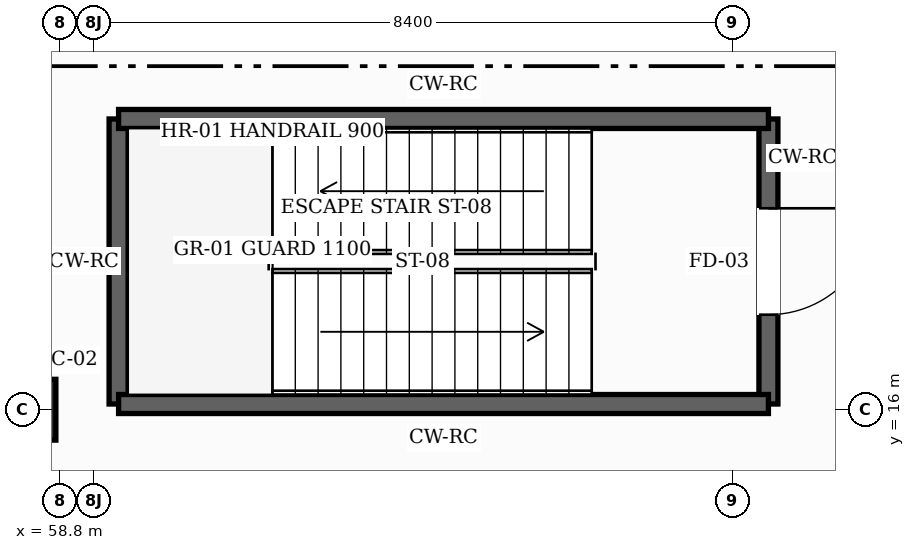
"""IFC4 building model, lengths in metres.
Left out: names, types, materials, properties, quantities, classifications, styles, units other than length and angle.
Written with IfcOpenShell. Run it as: python <this file> out.ifc"""

import sys

from ifc_helpers import new_model, si_unit, direction, frame, frame_2d, origin, origin_2d, place, context, subcontext, project, spatial, rectangle, hollow_rectangle, extrude, element, fill, save


model = new_model("IFC4")
c1 = context("Model", 3, precision=1e-05, world=origin(), true_north=direction((0.0, 1.0)))
c2 = subcontext(c1, "Body", "Model", "MODEL_VIEW")
j1 = project(units=[si_unit("LENGTHUNIT", "METRE"), si_unit("PLANEANGLEUNIT", "RADIAN")], contexts=[c1])
p1 = place(None, origin())
s1 = spatial("IfcSite", under=j1, at=p1, CompositionType="ELEMENT")
p2 = place(p1, origin())
s2 = spatial("IfcBuilding", under=s1, at=p2, CompositionType="ELEMENT")
p3 = place(p2, frame((0.0, 0.0, -5.4)))
s3 = spatial("IfcBuildingStorey", under=s2, at=p3, CompositionType="ELEMENT", Elevation=-5.4)
p4 = place(p3, frame((58.35, 16.0, 0.0), z_axis=(0.0, 0.0, 1.0), x_axis=(1.0, 0.0, 0.0)))
e1 = element("IfcColumn", 1, at=p4, inside=s3, PredefinedType="COLUMN", context=c2, shape_type="SweptSolid", body=[
    extrude(hollow_rectangle(XDim=0.8, YDim=0.8, WallThickness=0.032, InnerFilletRadius=0.032, OuterFilletRadius=0.064, at=origin_2d()), origin(), (0.0, 0.0, 1.0), 5.4),
])
p5 = place(p3, frame((68.125, 19.825, 0.0), z_axis=(0.0, 0.0, 1.0), x_axis=(0.0, -1.0, 0.0)))
e2 = element("IfcWall", 2, at=p5, inside=s3, PredefinedType="SHEAR", context=c2, shape_type="SweptSolid", body=[
    extrude(rectangle(XDim=3.75, YDim=0.25, at=frame_2d((1.875, 0.0))), origin(), (0.0, 0.0, 1.0), 5.12),
])
p6 = place(p5, frame((1.175, 0.0, 0.0)))
e3 = element("IfcOpeningElement", 3, at=p6, cuts=e2, PredefinedType="OPENING", context=c2, shape_type="SweptSolid", body=[
    extrude(rectangle(XDim=1.4, YDim=2.25, at=frame_2d((0.7, 1.125))), frame((0.0, 0.135, 0.0), z_axis=(0.0, -1.0, 0.0), x_axis=(1.0, 0.0, 0.0)), (0.0, 0.0, 1.0), 0.27),
])
p7 = place(p3, frame((59.575, 16.075, 0.0), z_axis=(0.0, 0.0, 1.0), x_axis=(0.0, 1.0, 0.0)))
e4 = element("IfcWall", 4, at=p7, inside=s3, PredefinedType="SHEAR", context=c2, shape_type="SweptSolid", body=[
    extrude(rectangle(XDim=3.75, YDim=0.25, at=frame_2d((1.875, 0.0))), origin(), (0.0, 0.0, 1.0), 5.12),
])
for number, where, z_axis, x_axis in (
    (5, (59.575, 19.825, 0.0), (0.0, 0.0, 1.0), (1.0, 0.0, 0.0)),
    (6, (68.125, 16.075, 0.0), (0.0, 0.0, 1.0), (-1.0, 0.0, 0.0)),
):
    element("IfcWall", number, at=place(p3, frame(where, z_axis=z_axis, x_axis=x_axis)), inside=s3, PredefinedType="SHEAR", context=c2, shape_type="SweptSolid", body=[
        extrude(rectangle(XDim=8.55, YDim=0.25, at=frame_2d((4.275, 0.0))), origin(), (0.0, 0.0, 1.0), 5.12),
    ])
p8 = place(p6, origin())
e7 = element("IfcDoor", 7, at=p8, inside=s3, OperationType="SINGLE_SWING_LEFT", PredefinedType="DOOR", context=c2, shape_type="SweptSolid", body=[
    extrude(rectangle(XDim=1.4, YDim=2.25, at=frame_2d((0.7, 1.125))), frame((0.0, 0.025, 0.0), z_axis=(0.0, -1.0, 0.0), x_axis=(1.0, 0.0, 0.0)), (0.0, 0.0, 1.0), 0.05),
])
fill(e3, e7)
save(model, sys.argv[1])
